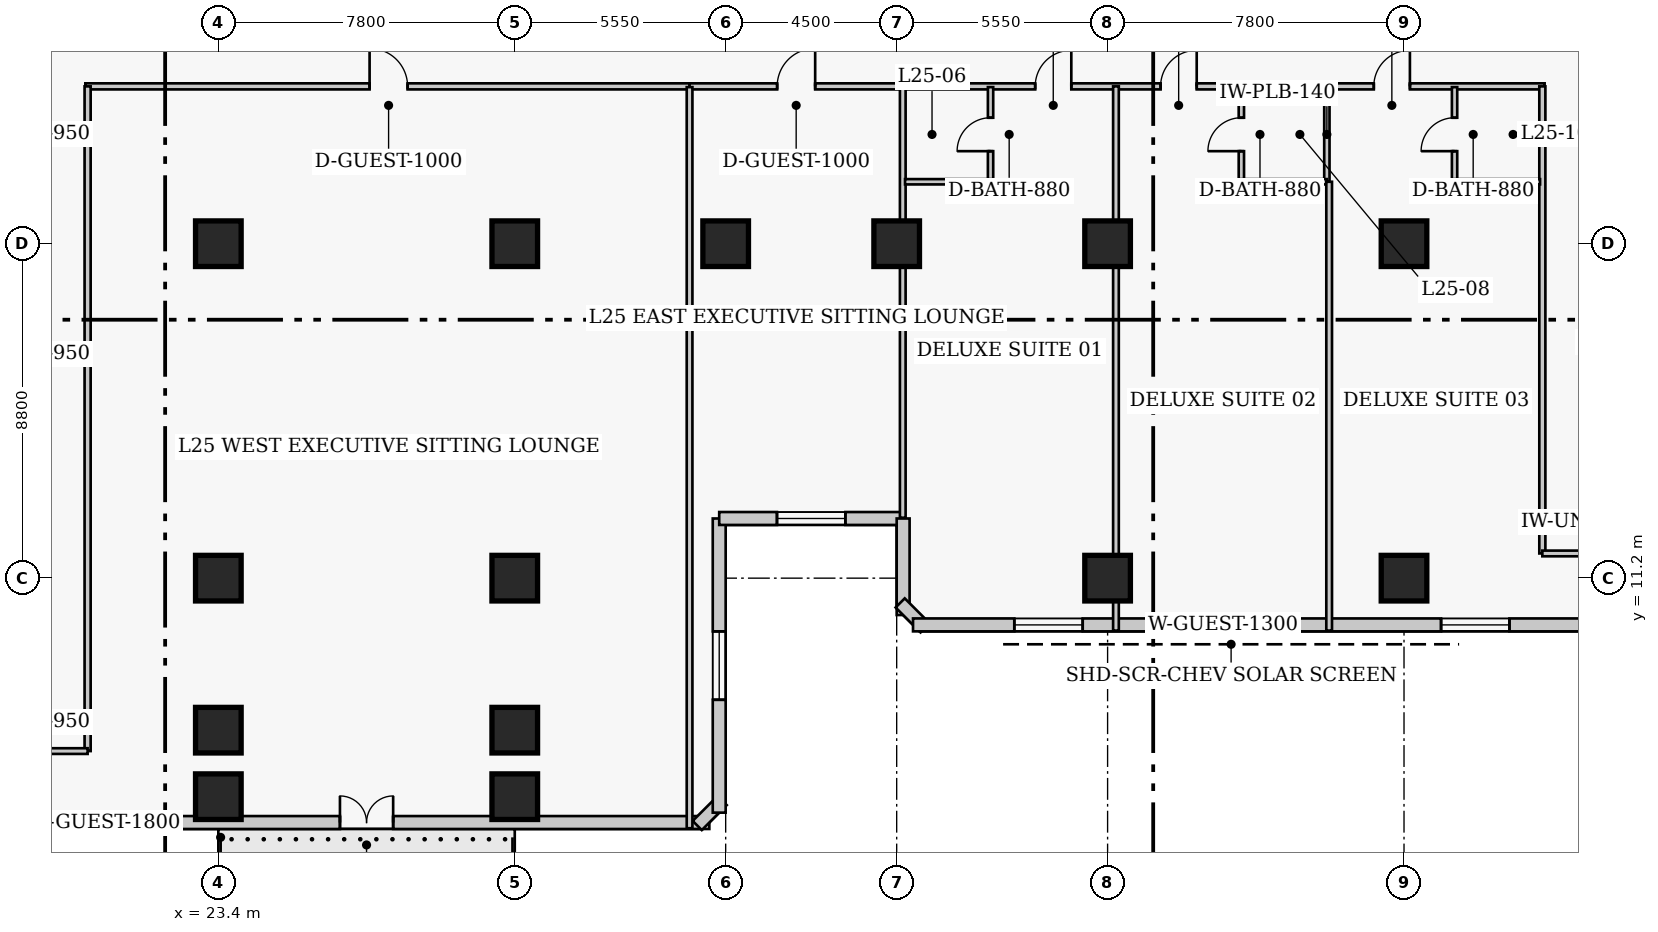
"""IFC4 building model, lengths in metres.
Left out: names, types, materials, properties, quantities, classifications, styles, units other than length and angle.
Written with IfcOpenShell. Run it as: python <this file> out.ifc"""

import sys

from ifc_helpers import new_model, si_unit, direction, frame, frame_2d, origin, origin_2d, place, context, subcontext, project, spatial, rectangle, extrude, element, fill, save


model = new_model("IFC4")
c1 = context("Model", 3, precision=1e-05, world=origin(), true_north=direction((0.0, 1.0)))
c2 = subcontext(c1, "Body", "Model", "MODEL_VIEW")
j1 = project(units=[si_unit("LENGTHUNIT", "METRE"), si_unit("PLANEANGLEUNIT", "RADIAN")], contexts=[c1])
p1 = place(None, origin())
s1 = spatial("IfcSite", under=j1, at=p1, CompositionType="ELEMENT")
p2 = place(p1, origin())
s2 = spatial("IfcBuilding", under=s1, at=p2, CompositionType="ELEMENT")
p3 = place(p2, frame((0.0, 0.0, 103.2)))
s3 = spatial("IfcBuildingStorey", under=s2, at=p3, CompositionType="ELEMENT", Elevation=103.2)
for number, where, z_axis, x_axis in (
    (1, (23.4, 11.2, 0.0), (0.0, 0.0, 1.0), (1.0, 0.0, 0.0)),
    (2, (23.4, 20.0, 0.0), (0.0, 0.0, 1.0), (1.0, 0.0, 0.0)),
    (3, (31.2, 11.2, 0.0), (0.0, 0.0, 1.0), (1.0, 0.0, 0.0)),
    (4, (31.2, 20.0, 0.0), (0.0, 0.0, 1.0), (1.0, 0.0, 0.0)),
    (5, (36.75, 20.0, 0.0), (0.0, 0.0, 1.0), (1.0, 0.0, 0.0)),
    (6, (41.25, 20.0, 0.0), (0.0, 0.0, 1.0), (1.0, 0.0, 0.0)),
    (7, (46.8, 11.2, 0.0), (0.0, 0.0, 1.0), (1.0, 0.0, 0.0)),
    (8, (46.8, 20.0, 0.0), (0.0, 0.0, 1.0), (1.0, 0.0, 0.0)),
    (9, (54.6, 11.2, 0.0), (0.0, 0.0, 1.0), (1.0, 0.0, 0.0)),
    (10, (54.6, 20.0, 0.0), (0.0, 0.0, 1.0), (1.0, 0.0, 0.0)),
    (11, (23.4, 7.2, 0.0), (0.0, 0.0, 1.0), (1.0, 0.0, 0.0)),
    (12, (31.2, 7.2, 0.0), (0.0, 0.0, 1.0), (1.0, 0.0, 0.0)),
    (13, (23.4, 5.45, 0.0), (0.0, 0.0, 1.0), (1.0, 0.0, 0.0)),
    (14, (31.2, 5.45, 0.0), (0.0, 0.0, 1.0), (1.0, 0.0, 0.0)),
):
    element("IfcColumn", number, at=place(p3, frame(where, z_axis=z_axis, x_axis=x_axis)), inside=s3, PredefinedType="COLUMN", context=c2, shape_type="SweptSolid", body=[
        extrude(rectangle(XDim=1.2, YDim=1.2, at=origin_2d()), origin(), (0.0, 0.0, 1.0), 3.8),
    ])
p4 = place(p3, frame((8.03, 4.77, 0.0), z_axis=(0.0, 0.0, 1.0), x_axis=(1.0, 0.0, 0.0)))
e15 = element("IfcWall", 15, at=p4, inside=s3, PredefinedType="SOLIDWALL", context=c2, shape_type="SweptSolid", body=[
    extrude(rectangle(XDim=28.29, YDim=0.34, at=frame_2d((14.145, 0.0))), origin(), (0.0, 0.0, 1.0), 3.54),
])
p5 = place(p4, frame((18.57, 0.0, 0.0)))
e16 = element("IfcOpeningElement", 16, at=p5, cuts=e15, PredefinedType="OPENING", context=c2, shape_type="SweptSolid", body=[
    extrude(rectangle(XDim=1.4, YDim=2.15, at=frame_2d((0.7, 1.075))), frame((0.0, 0.18, 0.0), z_axis=(0.0, -1.0, 0.0), x_axis=(1.0, 0.0, 0.0)), (0.0, 0.0, 1.0), 0.36),
])
p6 = place(p4, frame((12.595, 0.0, 0.85)))
e17 = element("IfcOpeningElement", 17, at=p6, cuts=e15, PredefinedType="OPENING", context=c2, shape_type="SweptSolid", body=[
    extrude(rectangle(XDim=1.8, YDim=1.8, at=frame_2d((0.9, 0.9))), frame((0.0, 0.18, 0.0), z_axis=(0.0, -1.0, 0.0), x_axis=(1.0, 0.0, 0.0)), (0.0, 0.0, 1.0), 0.36),
])
p7 = place(p3, frame((36.001, 4.692, 0.0), z_axis=(0.0, 0.0, 1.0), x_axis=(0.707238225886, 0.706975312048, 0.0)))
e18 = element("IfcWall", 18, at=p7, inside=s3, PredefinedType="SOLIDWALL", context=c2, shape_type="SweptSolid", body=[
    extrude(rectangle(XDim=0.929, YDim=0.34, at=frame_2d((0.464, 0.0))), origin(), (0.0, 0.0, 1.0), 3.54),
])
p8 = place(p3, frame((36.58, 5.03, 0.0), z_axis=(0.0, 0.0, 1.0), x_axis=(0.0, 1.0, 0.0)))
e19 = element("IfcWall", 19, at=p8, inside=s3, PredefinedType="SOLIDWALL", context=c2, shape_type="SweptSolid", body=[
    extrude(rectangle(XDim=7.74, YDim=0.34, at=frame_2d((3.87, 0.0))), origin(), (0.0, 0.0, 1.0), 3.54),
])
p9 = place(p8, frame((2.97, 0.0, 0.85)))
e20 = element("IfcOpeningElement", 20, at=p9, cuts=e19, PredefinedType="OPENING", context=c2, shape_type="SweptSolid", body=[
    extrude(rectangle(XDim=1.8, YDim=1.8, at=frame_2d((0.9, 0.9))), frame((0.0, 0.18, 0.0), z_axis=(0.0, -1.0, 0.0), x_axis=(1.0, 0.0, 0.0)), (0.0, 0.0, 1.0), 0.36),
])
p10 = place(p3, frame((36.58, 12.77, 0.0), z_axis=(0.0, 0.0, 1.0), x_axis=(1.0, 0.0, 0.0)))
e21 = element("IfcWall", 21, at=p10, inside=s3, PredefinedType="SOLIDWALL", context=c2, shape_type="SweptSolid", body=[
    extrude(rectangle(XDim=4.84, YDim=0.34, at=frame_2d((2.42, 0.0))), origin(), (0.0, 0.0, 1.0), 3.54),
])
p11 = place(p10, frame((1.52, 0.0, 0.85)))
e22 = element("IfcOpeningElement", 22, at=p11, cuts=e21, PredefinedType="OPENING", context=c2, shape_type="SweptSolid", body=[
    extrude(rectangle(XDim=1.8, YDim=1.8, at=frame_2d((0.9, 0.9))), frame((0.0, 0.18, 0.0), z_axis=(0.0, -1.0, 0.0), x_axis=(1.0, 0.0, 0.0)), (0.0, 0.0, 1.0), 0.36),
])
p12 = place(p3, frame((41.42, 12.77, 0.0), z_axis=(0.0, 0.0, 1.0), x_axis=(0.0, -1.0, 0.0)))
e23 = element("IfcWall", 23, at=p12, inside=s3, PredefinedType="SOLIDWALL", context=c2, shape_type="SweptSolid", body=[
    extrude(rectangle(XDim=2.54, YDim=0.34, at=frame_2d((1.27, 0.0))), origin(), (0.0, 0.0, 1.0), 3.54),
])
p13 = place(p3, frame((41.342, 10.549, 0.0), z_axis=(0.0, 0.0, 1.0), x_axis=(0.707106781187, -0.707106781187, 0.0)))
e24 = element("IfcWall", 24, at=p13, inside=s3, PredefinedType="SOLIDWALL", context=c2, shape_type="SweptSolid", body=[
    extrude(rectangle(XDim=0.929, YDim=0.34, at=frame_2d((0.464, 0.0))), origin(), (0.0, 0.0, 1.0), 3.54),
])
p14 = place(p3, frame((41.68, 9.97, 0.0), z_axis=(0.0, 0.0, 1.0), x_axis=(1.0, 0.0, 0.0)))
e25 = element("IfcWall", 25, at=p14, inside=s3, PredefinedType="SOLIDWALL", context=c2, shape_type="SweptSolid", body=[
    extrude(rectangle(XDim=28.29, YDim=0.34, at=frame_2d((14.145, 0.0))), origin(), (0.0, 0.0, 1.0), 3.54),
])
p15 = place(p14, frame((2.665, 0.0, 0.85)))
e26 = element("IfcOpeningElement", 26, at=p15, cuts=e25, PredefinedType="OPENING", context=c2, shape_type="SweptSolid", body=[
    extrude(rectangle(XDim=1.8, YDim=1.8, at=frame_2d((0.9, 0.9))), frame((0.0, 0.18, 0.0), z_axis=(0.0, -1.0, 0.0), x_axis=(1.0, 0.0, 0.0)), (0.0, 0.0, 1.0), 0.36),
])
p16 = place(p14, frame((13.895, 0.0, 0.85)))
e27 = element("IfcOpeningElement", 27, at=p16, cuts=e25, PredefinedType="OPENING", context=c2, shape_type="SweptSolid", body=[
    extrude(rectangle(XDim=1.8, YDim=1.8, at=frame_2d((0.9, 0.9))), frame((0.0, 0.18, 0.0), z_axis=(0.0, -1.0, 0.0), x_axis=(1.0, 0.0, 0.0)), (0.0, 0.0, 1.0), 0.36),
])
p17 = place(p14, frame((7.505, 0.0, 0.85)))
e28 = element("IfcOpeningElement", 28, at=p17, cuts=e25, PredefinedType="OPENING", context=c2, shape_type="SweptSolid", body=[
    extrude(rectangle(XDim=1.3, YDim=1.7, at=frame_2d((0.65, 0.85))), frame((0.0, 0.18, 0.0), z_axis=(0.0, -1.0, 0.0), x_axis=(1.0, 0.0, 0.0)), (0.0, 0.0, 1.0), 0.36),
])
p18 = place(p3, frame((19.9, 24.14, 0.0), z_axis=(0.0, 0.0, 1.0), x_axis=(1.0, 0.0, 0.0)))
e29 = element("IfcWall", 29, at=p18, inside=s3, PredefinedType="PARTITIONING", context=c2, shape_type="SweptSolid", body=[
    extrude(rectangle(XDim=15.9, YDim=0.16, at=frame_2d((7.95, 0.0))), origin(), (0.0, 0.0, 1.0), 3.54),
])
p19 = place(p18, frame((7.48, 0.0, 0.0)))
e30 = element("IfcOpeningElement", 30, at=p19, cuts=e29, PredefinedType="OPENING", context=c2, shape_type="SweptSolid", body=[
    extrude(rectangle(XDim=1.0, YDim=2.15, at=frame_2d((0.5, 1.075))), frame((0.0, 0.09, 0.0), z_axis=(0.0, -1.0, 0.0), x_axis=(1.0, 0.0, 0.0)), (0.0, 0.0, 1.0), 0.18),
])
p20 = place(p3, frame((35.8, 24.14, 0.0), z_axis=(0.0, 0.0, 1.0), x_axis=(1.0, 0.0, 0.0)))
e31 = element("IfcWall", 31, at=p20, inside=s3, PredefinedType="PARTITIONING", context=c2, shape_type="SweptSolid", body=[
    extrude(rectangle(XDim=22.5, YDim=0.16, at=frame_2d((11.25, 0.0))), origin(), (0.0, 0.0, 1.0), 3.54),
])
p21 = place(p20, frame((2.305, 0.0, 0.0)))
e32 = element("IfcOpeningElement", 32, at=p21, cuts=e31, PredefinedType="OPENING", context=c2, shape_type="SweptSolid", body=[
    extrude(rectangle(XDim=1.0, YDim=2.15, at=frame_2d((0.5, 1.075))), frame((0.0, 0.09, 0.0), z_axis=(0.0, -1.0, 0.0), x_axis=(1.0, 0.0, 0.0)), (0.0, 0.0, 1.0), 0.18),
])
p22 = place(p20, frame((9.095, 0.0, 0.0)))
e33 = element("IfcOpeningElement", 33, at=p22, cuts=e31, PredefinedType="OPENING", context=c2, shape_type="SweptSolid", body=[
    extrude(rectangle(XDim=0.95, YDim=2.1, at=frame_2d((0.475, 1.05))), frame((0.0, 0.09, 0.0), z_axis=(0.0, -1.0, 0.0), x_axis=(1.0, 0.0, 0.0)), (0.0, 0.0, 1.0), 0.18),
])
p23 = place(p20, frame((12.395, 0.0, 0.0)))
e34 = element("IfcOpeningElement", 34, at=p23, cuts=e31, PredefinedType="OPENING", context=c2, shape_type="SweptSolid", body=[
    extrude(rectangle(XDim=0.95, YDim=2.1, at=frame_2d((0.475, 1.05))), frame((0.0, 0.09, 0.0), z_axis=(0.0, -1.0, 0.0), x_axis=(1.0, 0.0, 0.0)), (0.0, 0.0, 1.0), 0.18),
])
p24 = place(p20, frame((18.005, 0.0, 0.0)))
e35 = element("IfcOpeningElement", 35, at=p24, cuts=e31, PredefinedType="OPENING", context=c2, shape_type="SweptSolid", body=[
    extrude(rectangle(XDim=0.95, YDim=2.1, at=frame_2d((0.475, 1.05))), frame((0.0, 0.09, 0.0), z_axis=(0.0, -1.0, 0.0), x_axis=(1.0, 0.0, 0.0)), (0.0, 0.0, 1.0), 0.18),
])
p25 = place(p3, frame((19.96, 6.65, 0.0), z_axis=(0.0, 0.0, 1.0), x_axis=(0.0, 1.0, 0.0)))
e36 = element("IfcWall", 36, at=p25, inside=s3, PredefinedType="PARTITIONING", context=c2, shape_type="SweptSolid", body=[
    extrude(rectangle(XDim=17.49, YDim=0.16, at=frame_2d((8.745, 0.0))), origin(), (0.0, 0.0, 1.0), 3.54),
])
p26 = place(p3, frame((58.24, 11.85, 0.0), z_axis=(0.0, 0.0, 1.0), x_axis=(0.0, 1.0, 0.0)))
e37 = element("IfcWall", 37, at=p26, inside=s3, PredefinedType="PARTITIONING", context=c2, shape_type="SweptSolid", body=[
    extrude(rectangle(XDim=12.29, YDim=0.16, at=frame_2d((6.145, 0.0))), origin(), (0.0, 0.0, 1.0), 3.54),
])
for number, where, z_axis, x_axis in (
    (38, (58.24, 11.85, 0.0), (0.0, 0.0, 1.0), (1.0, 0.0, 0.0)),
    (39, (17.74, 6.65, 0.0), (0.0, 0.0, 1.0), (1.0, 0.0, 0.0)),
):
    element("IfcWall", number, at=place(p3, frame(where, z_axis=z_axis, x_axis=x_axis)), inside=s3, PredefinedType="PARTITIONING", context=c2, shape_type="SweptSolid", body=[
        extrude(rectangle(XDim=2.22, YDim=0.15, at=frame_2d((1.11, 0.0))), origin(), (0.0, 0.0, 1.0), 3.54),
    ])
p27 = place(p3, frame((35.8, 4.62, 0.0), z_axis=(0.0, 0.0, 1.0), x_axis=(0.0, 1.0, 0.0)))
e40 = element("IfcWall", 40, at=p27, inside=s3, PredefinedType="PARTITIONING", context=c2, shape_type="SweptSolid", body=[
    extrude(rectangle(XDim=19.5, YDim=0.15, at=frame_2d((9.75, 0.0))), origin(), (0.0, 0.0, 1.0), 3.54),
])
p28 = place(p3, frame((41.41, 12.79, 0.0), z_axis=(0.0, 0.0, 1.0), x_axis=(0.0, 1.0, 0.0)))
e41 = element("IfcWall", 41, at=p28, inside=s3, PredefinedType="PARTITIONING", context=c2, shape_type="SweptSolid", body=[
    extrude(rectangle(XDim=11.35, YDim=0.15, at=frame_2d((5.675, 0.0))), origin(), (0.0, 0.0, 1.0), 3.54),
])
p29 = place(p3, frame((43.72, 21.63, 0.0), z_axis=(0.0, 0.0, 1.0), x_axis=(0.0, 1.0, 0.0)))
e42 = element("IfcWall", 42, at=p29, inside=s3, PredefinedType="PLUMBINGWALL", context=c2, shape_type="SweptSolid", body=[
    extrude(rectangle(XDim=2.49, YDim=0.14, at=frame_2d((1.245, 0.0))), origin(), (0.0, 0.0, 1.0), 3.54),
])
p30 = place(p29, frame((0.805, 0.0, 0.0)))
e43 = element("IfcOpeningElement", 43, at=p30, cuts=e42, PredefinedType="OPENING", context=c2, shape_type="SweptSolid", body=[
    extrude(rectangle(XDim=0.88, YDim=2.05, at=frame_2d((0.44, 1.025))), frame((0.0, 0.08, 0.0), z_axis=(0.0, -1.0, 0.0), x_axis=(1.0, 0.0, 0.0)), (0.0, 0.0, 1.0), 0.16),
])
p31 = place(p3, frame((41.47, 21.63, 0.0), z_axis=(0.0, 0.0, 1.0), x_axis=(1.0, 0.0, 0.0)))
e44 = element("IfcWall", 44, at=p31, inside=s3, PredefinedType="PLUMBINGWALL", context=c2, shape_type="SweptSolid", body=[
    extrude(rectangle(XDim=2.25, YDim=0.14, at=frame_2d((1.125, 0.0))), origin(), (0.0, 0.0, 1.0), 3.54),
])
p32 = place(p3, frame((47.02, 9.82, 0.0), z_axis=(0.0, 0.0, 1.0), x_axis=(0.0, 1.0, 0.0)))
e45 = element("IfcWall", 45, at=p32, inside=s3, PredefinedType="PARTITIONING", context=c2, shape_type="SweptSolid", body=[
    extrude(rectangle(XDim=14.32, YDim=0.15, at=frame_2d((7.16, 0.0))), origin(), (0.0, 0.0, 1.0), 2.679),
])
p33 = place(p3, frame((50.32, 21.63, 0.0), z_axis=(0.0, 0.0, 1.0), x_axis=(0.0, 1.0, 0.0)))
e46 = element("IfcWall", 46, at=p33, inside=s3, PredefinedType="PLUMBINGWALL", context=c2, shape_type="SweptSolid", body=[
    extrude(rectangle(XDim=2.49, YDim=0.14, at=frame_2d((1.245, 0.0))), origin(), (0.0, 0.0, 1.0), 3.54),
])
p34 = place(p33, frame((0.805, 0.0, 0.0)))
e47 = element("IfcOpeningElement", 47, at=p34, cuts=e46, PredefinedType="OPENING", context=c2, shape_type="SweptSolid", body=[
    extrude(rectangle(XDim=0.88, YDim=2.05, at=frame_2d((0.44, 1.025))), frame((0.0, 0.08, 0.0), z_axis=(0.0, -1.0, 0.0), x_axis=(1.0, 0.0, 0.0)), (0.0, 0.0, 1.0), 0.16),
])
p35 = place(p3, frame((52.57, 21.63, 0.0), z_axis=(0.0, 0.0, 1.0), x_axis=(0.0, 1.0, 0.0)))
e48 = element("IfcWall", 48, at=p35, inside=s3, PredefinedType="PLUMBINGWALL", context=c2, shape_type="SweptSolid", body=[
    extrude(rectangle(XDim=2.49, YDim=0.14, at=frame_2d((1.245, 0.0))), origin(), (0.0, 0.0, 1.0), 3.54),
])
p36 = place(p3, frame((50.32, 21.63, 0.0), z_axis=(0.0, 0.0, 1.0), x_axis=(1.0, 0.0, 0.0)))
e49 = element("IfcWall", 49, at=p36, inside=s3, PredefinedType="PLUMBINGWALL", context=c2, shape_type="SweptSolid", body=[
    extrude(rectangle(XDim=2.25, YDim=0.14, at=frame_2d((1.125, 0.0))), origin(), (0.0, 0.0, 1.0), 3.54),
])
p37 = place(p3, frame((52.63, 9.82, 0.0), z_axis=(0.0, 0.0, 1.0), x_axis=(0.0, 1.0, 0.0)))
e50 = element("IfcWall", 50, at=p37, inside=s3, PredefinedType="PARTITIONING", context=c2, shape_type="SweptSolid", body=[
    extrude(rectangle(XDim=11.81, YDim=0.15, at=frame_2d((5.905, 0.0))), origin(), (0.0, 0.0, 1.0), 3.54),
])
p38 = place(p3, frame((55.93, 21.63, 0.0), z_axis=(0.0, 0.0, 1.0), x_axis=(0.0, 1.0, 0.0)))
e51 = element("IfcWall", 51, at=p38, inside=s3, PredefinedType="PLUMBINGWALL", context=c2, shape_type="SweptSolid", body=[
    extrude(rectangle(XDim=2.49, YDim=0.14, at=frame_2d((1.245, 0.0))), origin(), (0.0, 0.0, 1.0), 3.54),
])
p39 = place(p38, frame((0.805, 0.0, 0.0)))
e52 = element("IfcOpeningElement", 52, at=p39, cuts=e51, PredefinedType="OPENING", context=c2, shape_type="SweptSolid", body=[
    extrude(rectangle(XDim=0.88, YDim=2.05, at=frame_2d((0.44, 1.025))), frame((0.0, 0.08, 0.0), z_axis=(0.0, -1.0, 0.0), x_axis=(1.0, 0.0, 0.0)), (0.0, 0.0, 1.0), 0.16),
])
p40 = place(p3, frame((55.93, 21.63, 0.0), z_axis=(0.0, 0.0, 1.0), x_axis=(1.0, 0.0, 0.0)))
e53 = element("IfcWall", 53, at=p40, inside=s3, PredefinedType="PLUMBINGWALL", context=c2, shape_type="SweptSolid", body=[
    extrude(rectangle(XDim=2.25, YDim=0.14, at=frame_2d((1.125, 0.0))), origin(), (0.0, 0.0, 1.0), 3.54),
])
p41 = place(p5, origin())
e54 = element("IfcDoor", 54, at=p41, inside=s3, OperationType="DOUBLE_DOOR_SINGLE_SWING", PredefinedType="DOOR", context=c2, shape_type="SweptSolid", body=[
    extrude(rectangle(XDim=1.4, YDim=2.15, at=frame_2d((0.7, 1.075))), frame((0.0, 0.025, 0.0), z_axis=(0.0, -1.0, 0.0), x_axis=(1.0, 0.0, 0.0)), (0.0, 0.0, 1.0), 0.05),
])
fill(e16, e54)
p42 = place(p6, origin())
e55 = element("IfcWindow", 55, at=p42, inside=s3, PartitioningType="SINGLE_PANEL", PredefinedType="WINDOW", context=c2, shape_type="SweptSolid", body=[
    extrude(rectangle(XDim=1.8, YDim=1.8, at=frame_2d((0.9, 0.9))), frame((0.0, 0.03, 0.0), z_axis=(0.0, -1.0, 0.0), x_axis=(1.0, 0.0, 0.0)), (0.0, 0.0, 1.0), 0.06),
])
fill(e17, e55)
p43 = place(p9, origin())
e56 = element("IfcWindow", 56, at=p43, inside=s3, PartitioningType="SINGLE_PANEL", PredefinedType="WINDOW", context=c2, shape_type="SweptSolid", body=[
    extrude(rectangle(XDim=1.8, YDim=1.8, at=frame_2d((0.9, 0.9))), frame((0.0, 0.03, 0.0), z_axis=(0.0, -1.0, 0.0), x_axis=(1.0, 0.0, 0.0)), (0.0, 0.0, 1.0), 0.06),
])
fill(e20, e56)
p44 = place(p11, origin())
e57 = element("IfcWindow", 57, at=p44, inside=s3, PartitioningType="SINGLE_PANEL", PredefinedType="WINDOW", context=c2, shape_type="SweptSolid", body=[
    extrude(rectangle(XDim=1.8, YDim=1.8, at=frame_2d((0.9, 0.9))), frame((0.0, 0.03, 0.0), z_axis=(0.0, -1.0, 0.0), x_axis=(1.0, 0.0, 0.0)), (0.0, 0.0, 1.0), 0.06),
])
fill(e22, e57)
p45 = place(p15, origin())
e58 = element("IfcWindow", 58, at=p45, inside=s3, PartitioningType="SINGLE_PANEL", PredefinedType="WINDOW", context=c2, shape_type="SweptSolid", body=[
    extrude(rectangle(XDim=1.8, YDim=1.8, at=frame_2d((0.9, 0.9))), frame((0.0, 0.03, 0.0), z_axis=(0.0, -1.0, 0.0), x_axis=(1.0, 0.0, 0.0)), (0.0, 0.0, 1.0), 0.06),
])
fill(e26, e58)
p46 = place(p16, origin())
e59 = element("IfcWindow", 59, at=p46, inside=s3, PartitioningType="SINGLE_PANEL", PredefinedType="WINDOW", context=c2, shape_type="SweptSolid", body=[
    extrude(rectangle(XDim=1.8, YDim=1.8, at=frame_2d((0.9, 0.9))), frame((0.0, 0.03, 0.0), z_axis=(0.0, -1.0, 0.0), x_axis=(1.0, 0.0, 0.0)), (0.0, 0.0, 1.0), 0.06),
])
fill(e27, e59)
p47 = place(p17, origin())
e60 = element("IfcWindow", 60, at=p47, inside=s3, PartitioningType="SINGLE_PANEL", PredefinedType="WINDOW", context=c2, shape_type="SweptSolid", body=[
    extrude(rectangle(XDim=1.3, YDim=1.7, at=frame_2d((0.65, 0.85))), frame((0.0, 0.03, 0.0), z_axis=(0.0, -1.0, 0.0), x_axis=(1.0, 0.0, 0.0)), (0.0, 0.0, 1.0), 0.06),
])
fill(e28, e60)
p48 = place(p19, origin())
e61 = element("IfcDoor", 61, at=p48, inside=s3, OperationType="SINGLE_SWING_LEFT", PredefinedType="DOOR", context=c2, shape_type="SweptSolid", body=[
    extrude(rectangle(XDim=1.0, YDim=2.15, at=frame_2d((0.5, 1.075))), frame((0.0, 0.025, 0.0), z_axis=(0.0, -1.0, 0.0), x_axis=(1.0, 0.0, 0.0)), (0.0, 0.0, 1.0), 0.05),
])
fill(e30, e61)
p49 = place(p21, origin())
e62 = element("IfcDoor", 62, at=p49, inside=s3, OperationType="SINGLE_SWING_RIGHT", PredefinedType="DOOR", context=c2, shape_type="SweptSolid", body=[
    extrude(rectangle(XDim=1.0, YDim=2.15, at=frame_2d((0.5, 1.075))), frame((0.0, 0.025, 0.0), z_axis=(0.0, -1.0, 0.0), x_axis=(1.0, 0.0, 0.0)), (0.0, 0.0, 1.0), 0.05),
])
fill(e32, e62)
p50 = place(p30, origin())
e63 = element("IfcDoor", 63, at=p50, inside=s3, OperationType="SINGLE_SWING_LEFT", PredefinedType="DOOR", context=c2, shape_type="SweptSolid", body=[
    extrude(rectangle(XDim=0.88, YDim=2.05, at=frame_2d((0.44, 1.025))), frame((0.0, 0.025, 0.0), z_axis=(0.0, -1.0, 0.0), x_axis=(1.0, 0.0, 0.0)), (0.0, 0.0, 1.0), 0.05),
])
fill(e43, e63)
p51 = place(p22, origin())
e64 = element("IfcDoor", 64, at=p51, inside=s3, OperationType="SINGLE_SWING_RIGHT", PredefinedType="DOOR", context=c2, shape_type="SweptSolid", body=[
    extrude(rectangle(XDim=0.95, YDim=2.1, at=frame_2d((0.475, 1.05))), frame((0.0, 0.025, 0.0), z_axis=(0.0, -1.0, 0.0), x_axis=(1.0, 0.0, 0.0)), (0.0, 0.0, 1.0), 0.05),
])
fill(e33, e64)
p52 = place(p34, origin())
e65 = element("IfcDoor", 65, at=p52, inside=s3, OperationType="SINGLE_SWING_LEFT", PredefinedType="DOOR", context=c2, shape_type="SweptSolid", body=[
    extrude(rectangle(XDim=0.88, YDim=2.05, at=frame_2d((0.44, 1.025))), frame((0.0, 0.025, 0.0), z_axis=(0.0, -1.0, 0.0), x_axis=(1.0, 0.0, 0.0)), (0.0, 0.0, 1.0), 0.05),
])
fill(e47, e65)
p53 = place(p23, origin())
e66 = element("IfcDoor", 66, at=p53, inside=s3, OperationType="SINGLE_SWING_RIGHT", PredefinedType="DOOR", context=c2, shape_type="SweptSolid", body=[
    extrude(rectangle(XDim=0.95, YDim=2.1, at=frame_2d((0.475, 1.05))), frame((0.0, 0.025, 0.0), z_axis=(0.0, -1.0, 0.0), x_axis=(1.0, 0.0, 0.0)), (0.0, 0.0, 1.0), 0.05),
])
fill(e34, e66)
p54 = place(p39, origin())
e67 = element("IfcDoor", 67, at=p54, inside=s3, OperationType="SINGLE_SWING_LEFT", PredefinedType="DOOR", context=c2, shape_type="SweptSolid", body=[
    extrude(rectangle(XDim=0.88, YDim=2.05, at=frame_2d((0.44, 1.025))), frame((0.0, 0.025, 0.0), z_axis=(0.0, -1.0, 0.0), x_axis=(1.0, 0.0, 0.0)), (0.0, 0.0, 1.0), 0.05),
])
fill(e52, e67)
p55 = place(p24, origin())
e68 = element("IfcDoor", 68, at=p55, inside=s3, OperationType="SINGLE_SWING_RIGHT", PredefinedType="DOOR", context=c2, shape_type="SweptSolid", body=[
    extrude(rectangle(XDim=0.95, YDim=2.1, at=frame_2d((0.475, 1.05))), frame((0.0, 0.025, 0.0), z_axis=(0.0, -1.0, 0.0), x_axis=(1.0, 0.0, 0.0)), (0.0, 0.0, 1.0), 0.05),
])
fill(e35, e68)
save(model, sys.argv[1])
